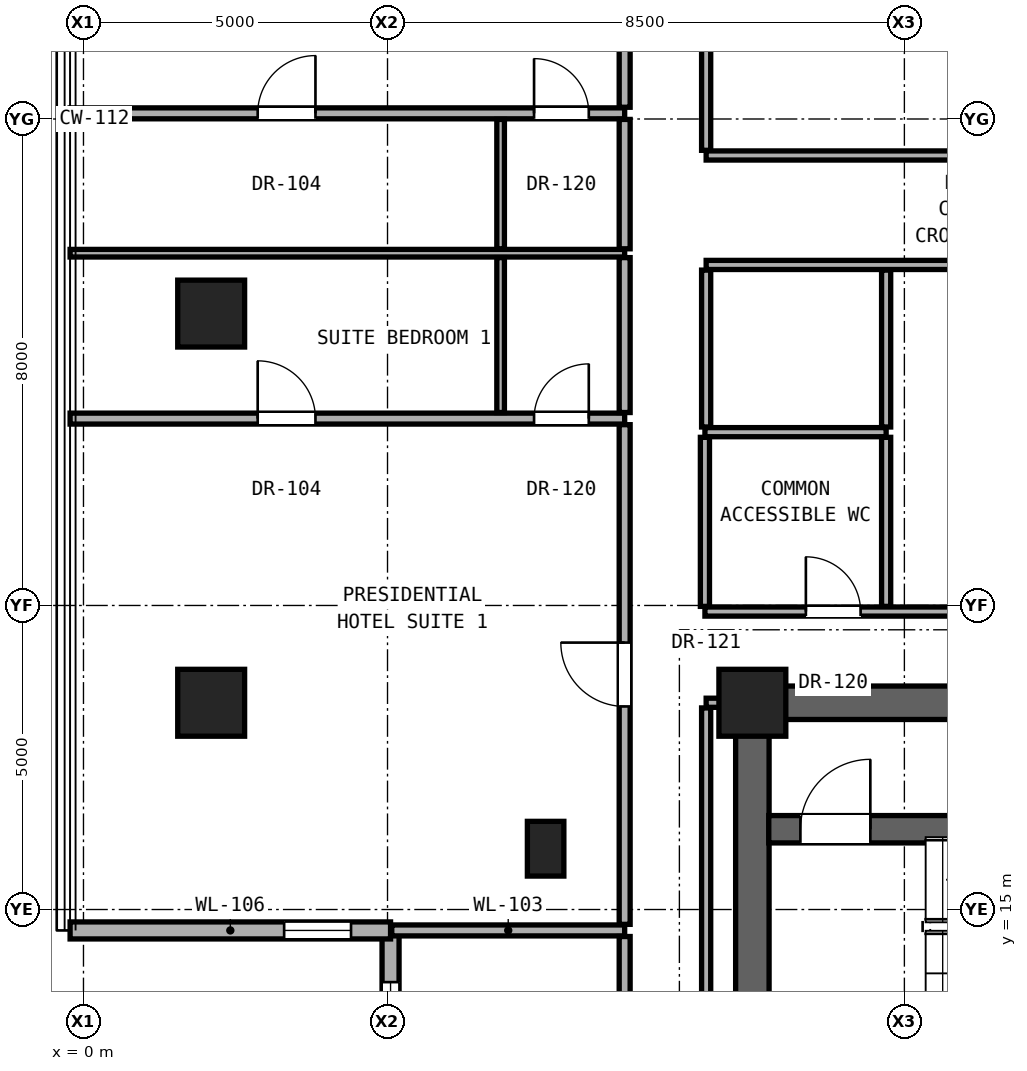
"""IFC4 building model, lengths in metres.
Left out: names, types, materials, properties, quantities, classifications, styles, units other than length and angle.
Written with IfcOpenShell. Run it as: python <this file> out.ifc"""

import sys

from ifc_helpers import new_model, si_unit, direction, frame, frame_2d, origin, origin_2d, place, context, subcontext, project, spatial, rectangle, hollow_rectangle, extrude, element, fill, save


model = new_model("IFC4")
c1 = context("Model", 3, precision=1e-05, world=origin(), true_north=direction((0.0, 1.0)))
c2 = subcontext(c1, "Body", "Model", "MODEL_VIEW")
j1 = project(units=[si_unit("LENGTHUNIT", "METRE"), si_unit("PLANEANGLEUNIT", "RADIAN")], contexts=[c1])
p1 = place(None, origin())
s1 = spatial("IfcSite", under=j1, at=p1, CompositionType="ELEMENT")
p2 = place(p1, origin())
s2 = spatial("IfcBuilding", under=s1, at=p2, CompositionType="ELEMENT")
p3 = place(p2, frame((0.0, 0.0, 128.0)))
s3 = spatial("IfcBuildingStorey", under=s2, at=p3, CompositionType="ELEMENT", Elevation=128.0)
p4 = place(p3, frame((11.0, 18.4, 0.0), z_axis=(0.0, 0.0, 1.0), x_axis=(1.0, 0.0, 0.0)))
e1 = element("IfcColumn", 1, at=p4, inside=s3, PredefinedType="COLUMN", context=c2, shape_type="SweptSolid", body=[
    extrude(rectangle(XDim=1.1, YDim=1.1, at=origin_2d()), origin(), (0.0, 0.0, 1.0), 3.3),
])
for number, where, z_axis, x_axis in (
    (2, (2.1, 18.4, 0.0), (0.0, 0.0, 1.0), (1.0, 0.0, 0.0)),
    (3, (2.1, 24.8, 0.0), (0.0, 0.0, 1.0), (1.0, 0.0, 0.0)),
):
    element("IfcColumn", number, at=place(p3, frame(where, z_axis=z_axis, x_axis=x_axis)), inside=s3, PredefinedType="COLUMN", context=c2, shape_type="SweptSolid", body=[
        extrude(hollow_rectangle(XDim=1.1, YDim=1.1, WallThickness=0.06, at=origin_2d()), origin(), (0.0, 0.0, 1.0), 3.3),
    ])
p5 = place(p3, frame((7.6, 16.0, 0.0), z_axis=(0.0, 0.0, 1.0), x_axis=(1.0, 0.0, 0.0)))
e4 = element("IfcColumn", 4, at=p5, inside=s3, PredefinedType="PILASTER", context=c2, shape_type="SweptSolid", body=[
    extrude(rectangle(XDim=0.6, YDim=0.9, at=origin_2d()), origin(), (0.0, 0.0, 1.0), 3.3),
])
p6 = place(p3, frame((11.0, 12.4, 0.0), z_axis=(0.0, 0.0, 1.0), x_axis=(0.0, 1.0, 0.0)))
e5 = element("IfcWall", 5, at=p6, inside=s3, PredefinedType="SHEAR", context=c2, shape_type="SweptSolid", body=[
    extrude(rectangle(XDim=6.0, YDim=0.55, at=frame_2d((3.0, 0.0))), origin(), (0.0, 0.0, 1.0), 3.08),
])
p7 = place(p3, frame((11.0, 18.4, 0.0), z_axis=(0.0, 0.0, 1.0), x_axis=(1.0, 0.0, 0.0)))
e6 = element("IfcWall", 6, at=p7, inside=s3, PredefinedType="SHEAR", context=c2, shape_type="SweptSolid", body=[
    extrude(rectangle(XDim=19.0, YDim=0.55, at=frame_2d((9.5, 0.0))), origin(), (0.0, 0.0, 1.0), 3.08),
])
p8 = place(p7, frame((4.175, 0.0, 0.0)))
e7 = element("IfcOpeningElement", 7, at=p8, cuts=e6, PredefinedType="OPENING", context=c2, shape_type="SweptSolid", body=[
    extrude(rectangle(XDim=1.2, YDim=2.25, at=frame_2d((0.6, 1.125))), frame((0.0, 0.285, 0.0), z_axis=(0.0, -1.0, 0.0), x_axis=(1.0, 0.0, 0.0)), (0.0, 0.0, 1.0), 0.57),
])
p9 = place(p7, frame((9.6, 0.0, 0.0)))
e8 = element("IfcOpeningElement", 8, at=p9, cuts=e6, PredefinedType="OPENING", context=c2, shape_type="SweptSolid", body=[
    extrude(rectangle(XDim=1.3, YDim=2.3, at=frame_2d((0.65, 1.15))), frame((0.0, 0.285, 0.0), z_axis=(0.0, -1.0, 0.0), x_axis=(1.0, 0.0, 0.0)), (0.0, 0.0, 1.0), 0.57),
])
p10 = place(p7, frame((11.9, 0.0, 0.0)))
e9 = element("IfcOpeningElement", 9, at=p10, cuts=e6, PredefinedType="OPENING", context=c2, shape_type="SweptSolid", body=[
    extrude(rectangle(XDim=1.3, YDim=2.3, at=frame_2d((0.65, 1.15))), frame((0.0, 0.285, 0.0), z_axis=(0.0, -1.0, 0.0), x_axis=(1.0, 0.0, 0.0)), (0.0, 0.0, 1.0), 0.57),
])
p11 = place(p7, frame((14.3, 0.0, 0.0)))
e10 = element("IfcOpeningElement", 10, at=p11, cuts=e6, PredefinedType="OPENING", context=c2, shape_type="SweptSolid", body=[
    extrude(rectangle(XDim=1.3, YDim=2.3, at=frame_2d((0.65, 1.15))), frame((0.0, 0.285, 0.0), z_axis=(0.0, -1.0, 0.0), x_axis=(1.0, 0.0, 0.0)), (0.0, 0.0, 1.0), 0.57),
])
p12 = place(p7, frame((16.6, 0.0, 0.0)))
e11 = element("IfcOpeningElement", 11, at=p12, cuts=e6, PredefinedType="OPENING", context=c2, shape_type="SweptSolid", body=[
    extrude(rectangle(XDim=1.3, YDim=2.3, at=frame_2d((0.65, 1.15))), frame((0.0, 0.285, 0.0), z_axis=(0.0, -1.0, 0.0), x_axis=(1.0, 0.0, 0.0)), (0.0, 0.0, 1.0), 0.57),
])
p13 = place(p3, frame((5.05, 14.656, 0.0), z_axis=(0.0, 0.0, 1.0), x_axis=(0.0, -1.0, 0.0)))
e12 = element("IfcWall", 12, at=p13, inside=s3, PredefinedType="SOLIDWALL", context=c2, shape_type="SweptSolid", body=[
    extrude(rectangle(XDim=5.27, YDim=0.28, at=frame_2d((2.635, 0.0))), origin(), (0.0, 0.0, 1.0), 3.06),
])
p14 = place(p13, frame((0.85, 0.0, 0.81)))
e13 = element("IfcOpeningElement", 13, at=p14, cuts=e12, PredefinedType="OPENING", context=c2, shape_type="SweptSolid", body=[
    extrude(rectangle(XDim=1.8, YDim=2.1, at=frame_2d((0.9, 1.05))), frame((0.0, 0.15, 0.0), z_axis=(0.0, -1.0, 0.0), x_axis=(1.0, 0.0, 0.0)), (0.0, 0.0, 1.0), 0.3),
])
p15 = place(p3, frame((-0.22, 14.656, 0.0), z_axis=(0.0, 0.0, 1.0), x_axis=(1.0, 0.0, 0.0)))
e14 = element("IfcWall", 14, at=p15, inside=s3, PredefinedType="SOLIDWALL", context=c2, shape_type="SweptSolid", body=[
    extrude(rectangle(XDim=5.27, YDim=0.28, at=frame_2d((2.635, 0.0))), origin(), (0.0, 0.0, 1.0), 3.06),
])
p16 = place(p15, frame((3.52, 0.0, 0.85)))
e15 = element("IfcOpeningElement", 15, at=p16, cuts=e14, PredefinedType="OPENING", context=c2, shape_type="SweptSolid", body=[
    extrude(rectangle(XDim=1.1, YDim=2.0, at=frame_2d((0.55, 1.0))), frame((0.0, 0.15, 0.0), z_axis=(0.0, -1.0, 0.0), x_axis=(1.0, 0.0, 0.0)), (0.0, 0.0, 1.0), 0.3),
])
p17 = place(p3, frame((5.07, 14.656, 0.0), z_axis=(0.0, 0.0, 1.0), x_axis=(1.0, 0.0, 0.0)))
e16 = element("IfcWall", 16, at=p17, inside=s3, PredefinedType="PARTITIONING", context=c2, shape_type="SweptSolid", body=[
    extrude(rectangle(XDim=3.83, YDim=0.18, at=frame_2d((1.915, 0.0))), origin(), (0.0, 0.0, 1.0), 3.08),
])
p18 = place(p3, frame((11.27, 16.32, 0.0), z_axis=(0.0, 0.0, 1.0), x_axis=(1.0, 0.0, 0.0)))
e17 = element("IfcWall", 17, at=p18, inside=s3, PredefinedType="SHEAR", context=c2, shape_type="SweptSolid", body=[
    extrude(rectangle(XDim=9.01, YDim=0.45, at=frame_2d((4.505, 0.0))), origin(), (0.0, 0.0, 1.0), 3.08),
])
p19 = place(p18, frame((0.52, 0.0, 0.0)))
e18 = element("IfcOpeningElement", 18, at=p19, cuts=e17, PredefinedType="OPENING", context=c2, shape_type="SweptSolid", body=[
    extrude(rectangle(XDim=1.15, YDim=2.2, at=frame_2d((0.575, 1.1))), frame((0.0, 0.235, 0.0), z_axis=(0.0, -1.0, 0.0), x_axis=(1.0, 0.0, 0.0)), (0.0, 0.0, 1.0), 0.47),
])
p20 = place(p3, frame((10.24, 18.4, 0.0), z_axis=(0.0, 0.0, 1.0), x_axis=(1.0, 0.0, 0.0)))
e19 = element("IfcWall", 19, at=p20, inside=s3, PredefinedType="PARTITIONING", context=c2, shape_type="SweptSolid", body=[
    extrude(rectangle(XDim=0.49, YDim=0.15, at=frame_2d((0.245, 0.0))), origin(), (0.0, 0.0, 1.0), 2.456),
])
p21 = place(p3, frame((10.22, 19.9, 0.0), z_axis=(0.0, 0.0, 1.0), x_axis=(1.0, 0.0, 0.0)))
e20 = element("IfcWall", 20, at=p21, inside=s3, PredefinedType="PARTITIONING", context=c2, shape_type="SweptSolid", body=[
    extrude(rectangle(XDim=9.34, YDim=0.15, at=frame_2d((4.67, 0.0))), origin(), (0.0, 0.0, 1.0), 2.216),
])
p22 = place(p21, frame((1.66, 0.0, 0.0)))
e21 = element("IfcOpeningElement", 21, at=p22, cuts=e20, PredefinedType="OPENING", context=c2, shape_type="SweptSolid", body=[
    extrude(rectangle(XDim=0.9, YDim=2.1, at=frame_2d((0.45, 1.05))), frame((0.0, 0.085, 0.0), z_axis=(0.0, -1.0, 0.0), x_axis=(1.0, 0.0, 0.0)), (0.0, 0.0, 1.0), 0.17),
])
p23 = place(p21, frame((5.665, 0.0, 0.0)))
e22 = element("IfcOpeningElement", 22, at=p23, cuts=e20, PredefinedType="OPENING", context=c2, shape_type="SweptSolid", body=[
    extrude(rectangle(XDim=0.95, YDim=2.15, at=frame_2d((0.475, 1.075))), frame((0.0, 0.085, 0.0), z_axis=(0.0, -1.0, 0.0), x_axis=(1.0, 0.0, 0.0)), (0.0, 0.0, 1.0), 0.17),
])
p24 = place(p3, frame((10.22, 22.85, 0.0), z_axis=(0.0, 0.0, 1.0), x_axis=(1.0, 0.0, 0.0)))
e23 = element("IfcWall", 23, at=p24, inside=s3, PredefinedType="PARTITIONING", context=c2, shape_type="SweptSolid", body=[
    extrude(rectangle(XDim=2.98, YDim=0.15, at=frame_2d((1.49, 0.0))), origin(), (0.0, 0.0, 1.0), 2.216),
])
p25 = place(p3, frame((-0.22, 23.073, 0.0), z_axis=(0.0, 0.0, 1.0), x_axis=(1.0, 0.0, 0.0)))
e24 = element("IfcWall", 24, at=p25, inside=s3, PredefinedType="PARTITIONING", context=c2, shape_type="SweptSolid", body=[
    extrude(rectangle(XDim=9.12, YDim=0.18, at=frame_2d((4.56, 0.0))), origin(), (0.0, 0.0, 1.0), 2.299),
])
p26 = place(p25, frame((3.085, 0.0, 0.0)))
e25 = element("IfcOpeningElement", 25, at=p26, cuts=e24, PredefinedType="OPENING", context=c2, shape_type="SweptSolid", body=[
    extrude(rectangle(XDim=0.95, YDim=2.15, at=frame_2d((0.475, 1.075))), frame((0.0, 0.1, 0.0), z_axis=(0.0, -1.0, 0.0), x_axis=(1.0, 0.0, 0.0)), (0.0, 0.0, 1.0), 0.2),
])
p27 = place(p25, frame((7.63, 0.0, 0.0)))
e26 = element("IfcOpeningElement", 26, at=p27, cuts=e24, PredefinedType="OPENING", context=c2, shape_type="SweptSolid", body=[
    extrude(rectangle(XDim=0.9, YDim=2.1, at=frame_2d((0.45, 1.05))), frame((0.0, 0.1, 0.0), z_axis=(0.0, -1.0, 0.0), x_axis=(1.0, 0.0, 0.0)), (0.0, 0.0, 1.0), 0.2),
])
p28 = place(p3, frame((10.24, 25.6, 0.0), z_axis=(0.0, 0.0, 1.0), x_axis=(1.0, 0.0, 0.0)))
e27 = element("IfcWall", 27, at=p28, inside=s3, PredefinedType="PARTITIONING", context=c2, shape_type="SweptSolid", body=[
    extrude(rectangle(XDim=9.36, YDim=0.15, at=frame_2d((4.68, 0.0))), origin(), (0.0, 0.0, 1.0), 2.216),
])
p29 = place(p3, frame((-0.22, 25.793, 0.0), z_axis=(0.0, 0.0, 1.0), x_axis=(1.0, 0.0, 0.0)))
e28 = element("IfcWall", 28, at=p29, inside=s3, PredefinedType="PARTITIONING", context=c2, shape_type="SweptSolid", body=[
    extrude(rectangle(XDim=9.12, YDim=0.125, at=frame_2d((4.56, 0.0))), origin(), (0.0, 0.0, 1.0), 2.299),
])
p30 = place(p3, frame((10.24, 27.4, 0.0), z_axis=(0.0, 0.0, 1.0), x_axis=(1.0, 0.0, 0.0)))
e29 = element("IfcWall", 29, at=p30, inside=s3, PredefinedType="PARTITIONING", context=c2, shape_type="SweptSolid", body=[
    extrude(rectangle(XDim=9.36, YDim=0.15, at=frame_2d((4.68, 0.0))), origin(), (0.0, 0.0, 1.0), 2.216),
])
p31 = place(p3, frame((-0.22, 28.093, 0.0), z_axis=(0.0, 0.0, 1.0), x_axis=(1.0, 0.0, 0.0)))
e30 = element("IfcWall", 30, at=p31, inside=s3, PredefinedType="PARTITIONING", context=c2, shape_type="SweptSolid", body=[
    extrude(rectangle(XDim=9.12, YDim=0.18, at=frame_2d((4.56, 0.0))), origin(), (0.0, 0.0, 1.0), 2.299),
])
p32 = place(p31, frame((3.085, 0.0, 0.0)))
e31 = element("IfcOpeningElement", 31, at=p32, cuts=e30, PredefinedType="OPENING", context=c2, shape_type="SweptSolid", body=[
    extrude(rectangle(XDim=0.95, YDim=2.15, at=frame_2d((0.475, 1.075))), frame((0.0, 0.1, 0.0), z_axis=(0.0, -1.0, 0.0), x_axis=(1.0, 0.0, 0.0)), (0.0, 0.0, 1.0), 0.2),
])
p33 = place(p31, frame((7.63, 0.0, 0.0)))
e32 = element("IfcOpeningElement", 32, at=p33, cuts=e30, PredefinedType="OPENING", context=c2, shape_type="SweptSolid", body=[
    extrude(rectangle(XDim=0.9, YDim=2.1, at=frame_2d((0.45, 1.05))), frame((0.0, 0.1, 0.0), z_axis=(0.0, -1.0, 0.0), x_axis=(1.0, 0.0, 0.0)), (0.0, 0.0, 1.0), 0.2),
])
p34 = place(p3, frame((6.86, 23.173, 0.0), z_axis=(0.0, 0.0, 1.0), x_axis=(0.0, 1.0, 0.0)))
e33 = element("IfcWall", 33, at=p34, inside=s3, PredefinedType="PARTITIONING", context=c2, shape_type="SweptSolid", body=[
    extrude(rectangle(XDim=2.547, YDim=0.125, at=frame_2d((1.274, 0.0))), origin(), (0.0, 0.0, 1.0), 2.299),
])
p35 = place(p3, frame((6.86, 25.865, 0.0), z_axis=(0.0, 0.0, 1.0), x_axis=(0.0, 1.0, 0.0)))
e34 = element("IfcWall", 34, at=p35, inside=s3, PredefinedType="PARTITIONING", context=c2, shape_type="SweptSolid", body=[
    extrude(rectangle(XDim=2.127, YDim=0.125, at=frame_2d((1.064, 0.0))), origin(), (0.0, 0.0, 1.0), 3.08),
])
p36 = place(p3, frame((8.9, 9.386, 0.0), z_axis=(0.0, 0.0, 1.0), x_axis=(0.0, 1.0, 0.0)))
e35 = element("IfcWall", 35, at=p36, inside=s3, PredefinedType="PARTITIONING", context=c2, shape_type="SweptSolid", body=[
    extrude(rectangle(XDim=5.17, YDim=0.18, at=frame_2d((2.585, 0.0))), origin(), (0.0, 0.0, 1.0), 3.08),
])
p37 = place(p36, frame((2.11, 0.0, 0.0)))
e36 = element("IfcOpeningElement", 36, at=p37, cuts=e35, PredefinedType="OPENING", context=c2, shape_type="SweptSolid", body=[
    extrude(rectangle(XDim=0.95, YDim=2.15, at=frame_2d((0.475, 1.075))), frame((0.0, 0.1, 0.0), z_axis=(0.0, -1.0, 0.0), x_axis=(1.0, 0.0, 0.0)), (0.0, 0.0, 1.0), 0.2),
])
p38 = place(p3, frame((8.9, 14.756, 0.0), z_axis=(0.0, 0.0, 1.0), x_axis=(0.0, 1.0, 0.0)))
e37 = element("IfcWall", 37, at=p38, inside=s3, PredefinedType="PARTITIONING", context=c2, shape_type="SweptSolid", body=[
    extrude(rectangle(XDim=8.217, YDim=0.18, at=frame_2d((4.108, 0.0))), origin(), (0.0, 0.0, 1.0), 2.456),
])
p39 = place(p38, frame((3.583, 0.0, 0.0)))
e38 = element("IfcOpeningElement", 38, at=p39, cuts=e37, PredefinedType="OPENING", context=c2, shape_type="SweptSolid", body=[
    extrude(rectangle(XDim=1.05, YDim=2.2, at=frame_2d((0.525, 1.1))), frame((0.0, 0.1, 0.0), z_axis=(0.0, -1.0, 0.0), x_axis=(1.0, 0.0, 0.0)), (0.0, 0.0, 1.0), 0.2),
])
p40 = place(p3, frame((8.9, 23.173, 0.0), z_axis=(0.0, 0.0, 1.0), x_axis=(0.0, 1.0, 0.0)))
e39 = element("IfcWall", 39, at=p40, inside=s3, PredefinedType="PARTITIONING", context=c2, shape_type="SweptSolid", body=[
    extrude(rectangle(XDim=2.547, YDim=0.18, at=frame_2d((1.274, 0.0))), origin(), (0.0, 0.0, 1.0), 2.299),
])
p41 = place(p3, frame((8.9, 25.865, 0.0), z_axis=(0.0, 0.0, 1.0), x_axis=(0.0, 1.0, 0.0)))
e40 = element("IfcWall", 40, at=p41, inside=s3, PredefinedType="PARTITIONING", context=c2, shape_type="SweptSolid", body=[
    extrude(rectangle(XDim=2.127, YDim=0.18, at=frame_2d((1.064, 0.0))), origin(), (0.0, 0.0, 1.0), 3.08),
])
p42 = place(p3, frame((8.9, 28.193, 0.0), z_axis=(0.0, 0.0, 1.0), x_axis=(0.0, 1.0, 0.0)))
e41 = element("IfcWall", 41, at=p42, inside=s3, PredefinedType="PARTITIONING", context=c2, shape_type="SweptSolid", body=[
    extrude(rectangle(XDim=13.051, YDim=0.18, at=frame_2d((6.525, 0.0))), origin(), (0.0, 0.0, 1.0), 2.299),
])
p43 = place(p42, frame((6.0, 0.0, 0.0)))
e42 = element("IfcOpeningElement", 42, at=p43, cuts=e41, PredefinedType="OPENING", context=c2, shape_type="SweptSolid", body=[
    extrude(rectangle(XDim=1.05, YDim=2.2, at=frame_2d((0.525, 1.1))), frame((0.0, 0.1, 0.0), z_axis=(0.0, -1.0, 0.0), x_axis=(1.0, 0.0, 0.0)), (0.0, 0.0, 1.0), 0.2),
])
p44 = place(p3, frame((10.22, 19.985, 0.0), z_axis=(0.0, 0.0, 1.0), x_axis=(0.0, 1.0, 0.0)))
e43 = element("IfcWall", 43, at=p44, inside=s3, PredefinedType="PARTITIONING", context=c2, shape_type="SweptSolid", body=[
    extrude(rectangle(XDim=2.78, YDim=0.15, at=frame_2d((1.39, 0.0))), origin(), (0.0, 0.0, 1.0), 3.08),
])
p45 = place(p3, frame((10.24, 12.335, 0.0), z_axis=(0.0, 0.0, 1.0), x_axis=(0.0, 1.0, 0.0)))
e44 = element("IfcWall", 44, at=p45, inside=s3, PredefinedType="PARTITIONING", context=c2, shape_type="SweptSolid", body=[
    extrude(rectangle(XDim=5.98, YDim=0.15, at=frame_2d((2.99, 0.0))), origin(), (0.0, 0.0, 1.0), 2.456),
])
p46 = place(p3, frame((10.24, 22.935, 0.0), z_axis=(0.0, 0.0, 1.0), x_axis=(0.0, 1.0, 0.0)))
e45 = element("IfcWall", 45, at=p46, inside=s3, PredefinedType="PARTITIONING", context=c2, shape_type="SweptSolid", body=[
    extrude(rectangle(XDim=2.58, YDim=0.15, at=frame_2d((1.29, 0.0))), origin(), (0.0, 0.0, 1.0), 2.299),
])
p47 = place(p3, frame((10.24, 27.485, 0.0), z_axis=(0.0, 0.0, 1.0), x_axis=(0.0, 1.0, 0.0)))
e46 = element("IfcWall", 46, at=p47, inside=s3, PredefinedType="PARTITIONING", context=c2, shape_type="SweptSolid", body=[
    extrude(rectangle(XDim=5.53, YDim=0.15, at=frame_2d((2.765, 0.0))), origin(), (0.0, 0.0, 1.0), 2.299),
])
p48 = place(p47, frame((2.29, 0.0, 0.0)))
e47 = element("IfcOpeningElement", 47, at=p48, cuts=e46, PredefinedType="OPENING", context=c2, shape_type="SweptSolid", body=[
    extrude(rectangle(XDim=0.95, YDim=2.15, at=frame_2d((0.475, 1.075))), frame((0.0, 0.085, 0.0), z_axis=(0.0, -1.0, 0.0), x_axis=(1.0, 0.0, 0.0)), (0.0, 0.0, 1.0), 0.17),
])
p49 = place(p3, frame((13.2, 19.985, 0.0), z_axis=(0.0, 0.0, 1.0), x_axis=(0.0, 1.0, 0.0)))
e48 = element("IfcWall", 48, at=p49, inside=s3, PredefinedType="PARTITIONING", context=c2, shape_type="SweptSolid", body=[
    extrude(rectangle(XDim=2.78, YDim=0.15, at=frame_2d((1.39, 0.0))), origin(), (0.0, 0.0, 1.0), 3.08),
])
p50 = place(p3, frame((13.2, 22.935, 0.0), z_axis=(0.0, 0.0, 1.0), x_axis=(0.0, 1.0, 0.0)))
e49 = element("IfcWall", 49, at=p50, inside=s3, PredefinedType="PARTITIONING", context=c2, shape_type="SweptSolid", body=[
    extrude(rectangle(XDim=2.58, YDim=0.15, at=frame_2d((1.29, 0.0))), origin(), (0.0, 0.0, 1.0), 2.216),
])
p51 = place(p14, origin())
e50 = element("IfcWindow", 50, at=p51, inside=s3, PartitioningType="SINGLE_PANEL", PredefinedType="WINDOW", context=c2, shape_type="SweptSolid", body=[
    extrude(rectangle(XDim=1.8, YDim=2.1, at=frame_2d((0.9, 1.05))), frame((0.0, 0.03, 0.0), z_axis=(0.0, -1.0, 0.0), x_axis=(1.0, 0.0, 0.0)), (0.0, 0.0, 1.0), 0.06),
])
fill(e13, e50)
p52 = place(p16, origin())
e51 = element("IfcWindow", 51, at=p52, inside=s3, PartitioningType="SINGLE_PANEL", PredefinedType="WINDOW", context=c2, shape_type="SweptSolid", body=[
    extrude(rectangle(XDim=1.1, YDim=2.0, at=frame_2d((0.55, 1.0))), frame((0.0, 0.03, 0.0), z_axis=(0.0, -1.0, 0.0), x_axis=(1.0, 0.0, 0.0)), (0.0, 0.0, 1.0), 0.06),
])
fill(e15, e51)
p53 = place(p19, origin())
e52 = element("IfcDoor", 52, at=p53, inside=s3, OperationType="SINGLE_SWING_RIGHT", PredefinedType="DOOR", context=c2, shape_type="SweptSolid", body=[
    extrude(rectangle(XDim=1.15, YDim=2.2, at=frame_2d((0.575, 1.1))), frame((0.0, 0.025, 0.0), z_axis=(0.0, -1.0, 0.0), x_axis=(1.0, 0.0, 0.0)), (0.0, 0.0, 1.0), 0.05),
])
fill(e18, e52)
p54 = place(p22, origin())
e53 = element("IfcDoor", 53, at=p54, inside=s3, OperationType="SINGLE_SWING_LEFT", PredefinedType="DOOR", context=c2, shape_type="SweptSolid", body=[
    extrude(rectangle(XDim=0.9, YDim=2.1, at=frame_2d((0.45, 1.05))), frame((0.0, 0.025, 0.0), z_axis=(0.0, -1.0, 0.0), x_axis=(1.0, 0.0, 0.0)), (0.0, 0.0, 1.0), 0.05),
])
fill(e21, e53)
p55 = place(p39, origin())
e54 = element("IfcDoor", 54, at=p55, inside=s3, OperationType="SINGLE_SWING_RIGHT", PredefinedType="DOOR", context=c2, shape_type="SweptSolid", body=[
    extrude(rectangle(XDim=1.05, YDim=2.2, at=frame_2d((0.525, 1.1))), frame((0.0, 0.025, 0.0), z_axis=(0.0, -1.0, 0.0), x_axis=(1.0, 0.0, 0.0)), (0.0, 0.0, 1.0), 0.05),
])
fill(e38, e54)
p56 = place(p26, origin())
e55 = element("IfcDoor", 55, at=p56, inside=s3, OperationType="SINGLE_SWING_LEFT", PredefinedType="DOOR", context=c2, shape_type="SweptSolid", body=[
    extrude(rectangle(XDim=0.95, YDim=2.15, at=frame_2d((0.475, 1.075))), frame((0.0, 0.025, 0.0), z_axis=(0.0, -1.0, 0.0), x_axis=(1.0, 0.0, 0.0)), (0.0, 0.0, 1.0), 0.05),
])
fill(e25, e55)
p57 = place(p27, origin())
e56 = element("IfcDoor", 56, at=p57, inside=s3, OperationType="SINGLE_SWING_RIGHT", PredefinedType="DOOR", context=c2, shape_type="SweptSolid", body=[
    extrude(rectangle(XDim=0.9, YDim=2.1, at=frame_2d((0.45, 1.05))), frame((0.0, 0.025, 0.0), z_axis=(0.0, -1.0, 0.0), x_axis=(1.0, 0.0, 0.0)), (0.0, 0.0, 1.0), 0.05),
])
fill(e26, e56)
p58 = place(p32, origin())
e57 = element("IfcDoor", 57, at=p58, inside=s3, OperationType="SINGLE_SWING_RIGHT", PredefinedType="DOOR", context=c2, shape_type="SweptSolid", body=[
    extrude(rectangle(XDim=0.95, YDim=2.15, at=frame_2d((0.475, 1.075))), frame((0.0, 0.025, 0.0), z_axis=(0.0, -1.0, 0.0), x_axis=(1.0, 0.0, 0.0)), (0.0, 0.0, 1.0), 0.05),
])
fill(e31, e57)
p59 = place(p33, origin())
e58 = element("IfcDoor", 58, at=p59, inside=s3, OperationType="SINGLE_SWING_LEFT", PredefinedType="DOOR", context=c2, shape_type="SweptSolid", body=[
    extrude(rectangle(XDim=0.9, YDim=2.1, at=frame_2d((0.45, 1.05))), frame((0.0, 0.025, 0.0), z_axis=(0.0, -1.0, 0.0), x_axis=(1.0, 0.0, 0.0)), (0.0, 0.0, 1.0), 0.05),
])
fill(e32, e58)
save(model, sys.argv[1])
